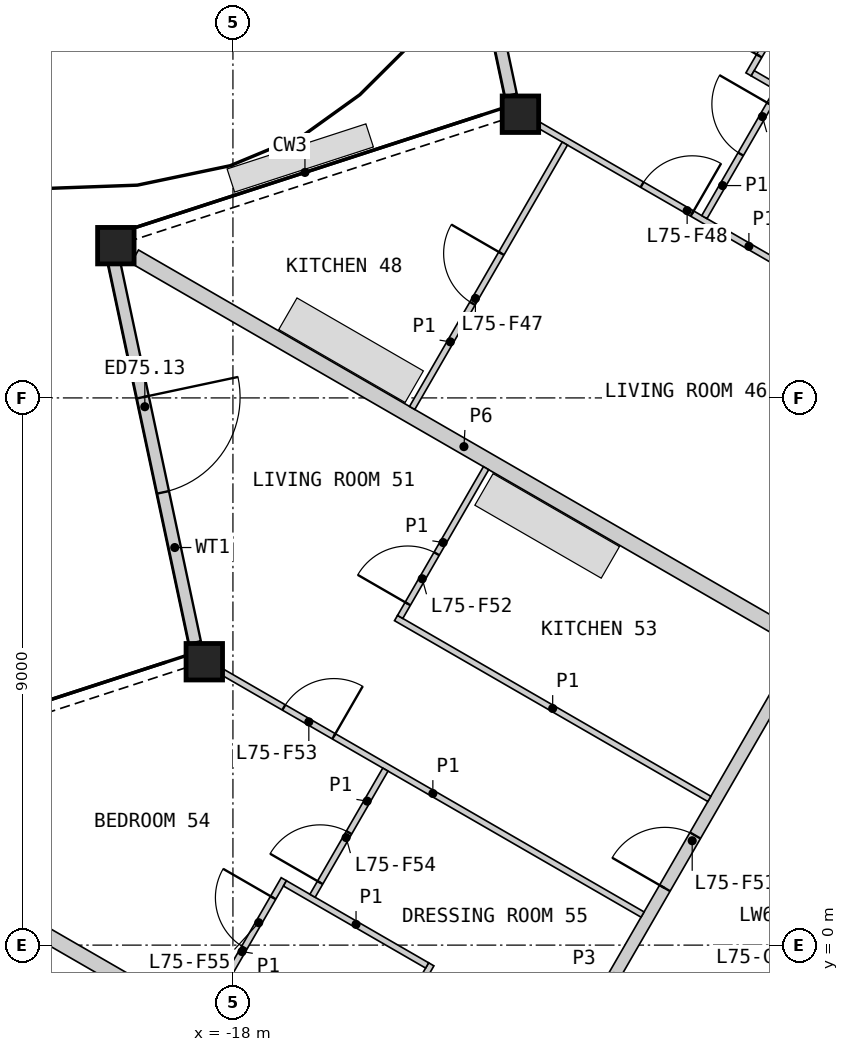
"""IFC4 building model, lengths in metres.
Left out: names, types, materials, properties, quantities, classifications, styles, units other than length and angle.
Written with IfcOpenShell. Run it as: python <this file> out.ifc"""

import sys

from ifc_helpers import new_model, si_unit, direction, frame, frame_2d, origin, origin_2d, place, context, subcontext, project, spatial, rectangle, hollow_rectangle, extrude, element, fill, save


model = new_model("IFC4")
c1 = context("Model", 3, precision=1e-05, world=origin(), true_north=direction((0.0, 1.0)))
c2 = subcontext(c1, "Body", "Model", "MODEL_VIEW")
j1 = project(units=[si_unit("LENGTHUNIT", "METRE"), si_unit("PLANEANGLEUNIT", "RADIAN")], contexts=[c1])
p1 = place(None, origin())
s1 = spatial("IfcSite", under=j1, at=p1, CompositionType="ELEMENT")
p2 = place(p1, origin())
s2 = spatial("IfcBuilding", under=s1, at=p2, CompositionType="ELEMENT")
p3 = place(p2, frame((0.0, 0.0, 335.8)))
s3 = spatial("IfcBuildingStorey", under=s2, at=p3, CompositionType="ELEMENT", Elevation=335.8)
for number, where, z_axis, x_axis in (
    (1, (-13.272, 13.666, 0.0), (0.0, 0.0, 1.0), (1.0, 0.0, 0.0)),
    (2, (-19.926, 11.504, 0.0), (0.0, 0.0, 1.0), (1.0, 0.0, 0.0)),
    (3, (-18.471, 4.661, 0.0), (0.0, 0.0, 1.0), (1.0, 0.0, 0.0)),
):
    element("IfcColumn", number, at=place(p3, frame(where, z_axis=z_axis, x_axis=x_axis)), inside=s3, PredefinedType="COLUMN", context=c2, shape_type="SweptSolid", body=[
        extrude(hollow_rectangle(XDim=0.6, YDim=0.6, WallThickness=0.04, at=origin_2d()), origin(), (0.0, 0.0, 1.0), 3.4),
    ])
p4 = place(p3, frame((-14.756, 20.225, 0.0), z_axis=(0.0, 0.0, 1.0), x_axis=(0.207888038934, -0.978152627798, 0.0)))
e4 = element("IfcWall", 4, at=p4, inside=s3, PredefinedType="SOLIDWALL", context=c2, shape_type="SweptSolid", body=[
    extrude(rectangle(XDim=6.382, YDim=0.2, at=frame_2d((3.191, 0.0))), origin(), (0.0, 0.0, 1.0), 2.488),
])
p5 = place(p4, frame((2.262, 0.0, 0.0)))
e5 = element("IfcOpeningElement", 5, at=p5, cuts=e4, PredefinedType="OPENING", context=c2, shape_type="SweptSolid", body=[
    extrude(rectangle(XDim=1.6, YDim=2.25, at=frame_2d((0.8, 1.125))), frame((0.0, 0.11, 0.0), z_axis=(0.0, -1.0, 0.0), x_axis=(1.0, 0.0, 0.0)), (0.0, 0.0, 1.0), 0.22),
])
p6 = place(p3, frame((-19.953, 11.225, 0.0), z_axis=(0.0, 0.0, 1.0), x_axis=(0.207915447, -0.978146802325, 0.0)))
e6 = element("IfcWall", 6, at=p6, inside=s3, PredefinedType="SOLIDWALL", context=c2, shape_type="SweptSolid", body=[
    extrude(rectangle(XDim=6.387, YDim=0.2, at=frame_2d((3.193, 0.0))), origin(), (0.0, 0.0, 1.0), 2.488),
])
p7 = place(p6, frame((2.262, 0.0, 0.0)))
e7 = element("IfcOpeningElement", 7, at=p7, cuts=e6, PredefinedType="OPENING", context=c2, shape_type="SweptSolid", body=[
    extrude(rectangle(XDim=1.6, YDim=2.25, at=frame_2d((0.8, 1.125))), frame((0.0, 0.11, 0.0), z_axis=(0.0, -1.0, 0.0), x_axis=(1.0, 0.0, 0.0)), (0.0, 0.0, 1.0), 0.22),
])
p8 = place(p3, frame((-8.44, -0.208, 0.0), z_axis=(0.0, 0.0, 1.0), x_axis=(-0.500001951578, -0.866024277037, 0.0)))
e8 = element("IfcWall", 8, at=p8, inside=s3, PredefinedType="SHEAR", context=c2, shape_type="SweptSolid", body=[
    extrude(rectangle(XDim=2.243, YDim=0.6, at=frame_2d((1.122, 0.0))), origin(), (0.0, 0.0, 1.0), 3.1),
])
p9 = place(p8, frame((0.7, 0.0, 0.0)))
e9 = element("IfcOpeningElement", 9, at=p9, cuts=e8, PredefinedType="OPENING", context=c2, shape_type="SweptSolid", body=[
    extrude(rectangle(XDim=1.0, YDim=2.1, at=frame_2d((0.5, 1.05))), frame((0.0, 0.31, 0.0), z_axis=(0.0, -1.0, 0.0), x_axis=(1.0, 0.0, 0.0)), (0.0, 0.0, 1.0), 0.62),
])
p10 = place(p3, frame((-19.615, 11.325, 0.0), z_axis=(0.0, 0.0, 1.0), x_axis=(0.86602139559, -0.500006942333, 0.0)))
e10 = element("IfcWall", 10, at=p10, inside=s3, PredefinedType="PARTITIONING", context=c2, shape_type="SweptSolid", body=[
    extrude(rectangle(XDim=12.505, YDim=0.25, at=frame_2d((6.252, 0.0))), origin(), (0.0, 0.0, 1.0), 2.33),
])
p11 = place(p3, frame((-12.748, -2.269, 0.0), z_axis=(0.0, 0.0, 1.0), x_axis=(0.499984266882, 0.866034487114, 0.0)))
e11 = element("IfcWall", 11, at=p11, inside=s3, PredefinedType="PARTITIONING", context=c2, shape_type="SweptSolid", body=[
    extrude(rectangle(XDim=8.099, YDim=0.2, at=frame_2d((4.049, 0.0))), origin(), (0.0, 0.0, 1.0), 3.1),
])
p12 = place(p11, frame((3.702, 0.0, 0.0)))
e12 = element("IfcOpeningElement", 12, at=p12, cuts=e11, PredefinedType="OPENING", context=c2, shape_type="SweptSolid", body=[
    extrude(rectangle(XDim=1.0, YDim=2.1, at=frame_2d((0.5, 1.05))), frame((0.0, 0.11, 0.0), z_axis=(0.0, -1.0, 0.0), x_axis=(1.0, 0.0, 0.0)), (0.0, 0.0, 1.0), 0.22),
])
p13 = place(p3, frame((-24.815, 2.326, 0.0), z_axis=(0.0, 0.0, 1.0), x_axis=(0.866024038922, -0.500002364004, 0.0)))
e13 = element("IfcWall", 13, at=p13, inside=s3, PredefinedType="PARTITIONING", context=c2, shape_type="SweptSolid", body=[
    extrude(rectangle(XDim=7.198, YDim=0.25, at=frame_2d((3.599, 0.0))), origin(), (0.0, 0.0, 1.0), 2.33),
])
p14 = place(p3, frame((-18.161, 4.485, 0.0), z_axis=(0.0, 0.0, 1.0), x_axis=(0.866023773276, -0.500002824113, 0.0)))
e14 = element("IfcWall", 14, at=p14, inside=s3, PredefinedType="PARTITIONING", context=c2, shape_type="SweptSolid", body=[
    extrude(rectangle(XDim=7.965, YDim=0.1, at=frame_2d((3.982, 0.0))), origin(), (0.0, 0.0, 1.0), 2.33),
])
p15 = place(p14, frame((1.152, 0.0, 0.0)))
e15 = element("IfcOpeningElement", 15, at=p15, cuts=e14, PredefinedType="OPENING", context=c2, shape_type="SweptSolid", body=[
    extrude(rectangle(XDim=0.95, YDim=2.1, at=frame_2d((0.475, 1.05))), frame((0.0, 0.06, 0.0), z_axis=(0.0, -1.0, 0.0), x_axis=(1.0, 0.0, 0.0)), (0.0, 0.0, 1.0), 0.12),
])
p16 = place(p3, frame((-12.962, 13.484, 0.0), z_axis=(0.0, 0.0, 1.0), x_axis=(0.866032392051, -0.499987895772, 0.0)))
e16 = element("IfcWall", 16, at=p16, inside=s3, PredefinedType="PARTITIONING", context=c2, shape_type="SweptSolid", body=[
    extrude(rectangle(XDim=7.962, YDim=0.1, at=frame_2d((3.981, 0.0))), origin(), (0.0, 0.0, 1.0), 2.33),
])
p17 = place(p16, frame((1.953, 0.0, 0.0)))
e17 = element("IfcOpeningElement", 17, at=p17, cuts=e16, PredefinedType="OPENING", context=c2, shape_type="SweptSolid", body=[
    extrude(rectangle(XDim=0.95, YDim=2.1, at=frame_2d((0.475, 1.05))), frame((0.0, 0.06, 0.0), z_axis=(0.0, -1.0, 0.0), x_axis=(1.0, 0.0, 0.0)), (0.0, 0.0, 1.0), 0.12),
])
p18 = place(p3, frame((-15.318, 5.38, 0.0), z_axis=(0.0, 0.0, 1.0), x_axis=(0.866035260786, -0.499982926783, 0.0)))
e18 = element("IfcWall", 18, at=p18, inside=s3, PredefinedType="PARTITIONING", context=c2, shape_type="SweptSolid", body=[
    extrude(rectangle(XDim=5.95, YDim=0.1, at=frame_2d((2.975, 0.0))), origin(), (0.0, 0.0, 1.0), 2.33),
])
p19 = place(p3, frame((-17.488, -5.079, 0.0), z_axis=(0.0, 0.0, 1.0), x_axis=(0.499996545922, 0.866027397988, 0.0)))
e19 = element("IfcWall", 19, at=p19, inside=s3, PredefinedType="PARTITIONING", context=c2, shape_type="SweptSolid", body=[
    extrude(rectangle(XDim=5.5, YDim=0.1, at=frame_2d((2.75, 0.0))), origin(), (0.0, 0.0, 1.0), 2.33),
])
p20 = place(p3, frame((-19.913, -3.679, 0.0), z_axis=(0.0, 0.0, 1.0), x_axis=(0.500015767406, 0.866016300277, 0.0)))
e20 = element("IfcWall", 20, at=p20, inside=s3, PredefinedType="PARTITIONING", context=c2, shape_type="SweptSolid", body=[
    extrude(rectangle(XDim=5.5, YDim=0.1, at=frame_2d((2.75, 0.0))), origin(), (0.0, 0.0, 1.0), 2.33),
])
p21 = place(p20, frame((4.199, 0.0, 0.0)))
e21 = element("IfcOpeningElement", 21, at=p21, cuts=e20, PredefinedType="OPENING", context=c2, shape_type="SweptSolid", body=[
    extrude(rectangle(XDim=0.95, YDim=2.1, at=frame_2d((0.475, 1.05))), frame((0.0, 0.06, 0.0), z_axis=(0.0, -1.0, 0.0), x_axis=(1.0, 0.0, 0.0)), (0.0, 0.0, 1.0), 0.12),
])
p22 = place(p20, frame((0.25, 0.0, 0.0)))
e22 = element("IfcOpeningElement", 22, at=p22, cuts=e20, PredefinedType="OPENING", context=c2, shape_type="SweptSolid", body=[
    extrude(rectangle(XDim=0.95, YDim=2.1, at=frame_2d((0.475, 1.05))), frame((0.0, 0.06, 0.0), z_axis=(0.0, -1.0, 0.0), x_axis=(1.0, 0.0, 0.0)), (0.0, 0.0, 1.0), 0.12),
])
p23 = place(p3, frame((-9.52, 14.321, 0.0), z_axis=(0.0, 0.0, 1.0), x_axis=(0.49997732567, 0.866038494419, 0.0)))
e23 = element("IfcWall", 23, at=p23, inside=s3, PredefinedType="PARTITIONING", context=c2, shape_type="SweptSolid", body=[
    extrude(rectangle(XDim=5.5, YDim=0.1, at=frame_2d((2.75, 0.0))), origin(), (0.0, 0.0, 1.0), 2.33),
])
p24 = place(p23, frame((4.3, 0.0, 0.0)))
e24 = element("IfcOpeningElement", 24, at=p24, cuts=e23, PredefinedType="OPENING", context=c2, shape_type="SweptSolid", body=[
    extrude(rectangle(XDim=0.95, YDim=2.1, at=frame_2d((0.475, 1.05))), frame((0.0, 0.06, 0.0), z_axis=(0.0, -1.0, 0.0), x_axis=(1.0, 0.0, 0.0)), (0.0, 0.0, 1.0), 0.12),
])
p25 = place(p23, frame((0.351, 0.0, 0.0)))
e25 = element("IfcOpeningElement", 25, at=p25, cuts=e23, PredefinedType="OPENING", context=c2, shape_type="SweptSolid", body=[
    extrude(rectangle(XDim=0.95, YDim=2.1, at=frame_2d((0.475, 1.05))), frame((0.0, 0.06, 0.0), z_axis=(0.0, -1.0, 0.0), x_axis=(1.0, 0.0, 0.0)), (0.0, 0.0, 1.0), 0.12),
])
p26 = place(p3, frame((-15.052, 8.835, 0.0), z_axis=(0.0, 0.0, 1.0), x_axis=(0.500008642379, 0.866020414047, 0.0)))
e26 = element("IfcWall", 26, at=p26, inside=s3, PredefinedType="PARTITIONING", context=c2, shape_type="SweptSolid", body=[
    extrude(rectangle(XDim=5.021, YDim=0.1, at=frame_2d((2.511, 0.0))), origin(), (0.0, 0.0, 1.0), 2.33),
])
p27 = place(p26, frame((1.985, 0.0, 0.0)))
e27 = element("IfcOpeningElement", 27, at=p27, cuts=e26, PredefinedType="OPENING", context=c2, shape_type="SweptSolid", body=[
    extrude(rectangle(XDim=0.95, YDim=2.1, at=frame_2d((0.475, 1.05))), frame((0.0, 0.06, 0.0), z_axis=(0.0, -1.0, 0.0), x_axis=(1.0, 0.0, 0.0)), (0.0, 0.0, 1.0), 0.12),
])
p28 = place(p3, frame((-15.25, 5.398, 0.0), z_axis=(0.0, 0.0, 1.0), x_axis=(0.499959355765, 0.866048868473, 0.0)))
e28 = element("IfcWall", 28, at=p28, inside=s3, PredefinedType="PARTITIONING", context=c2, shape_type="SweptSolid", body=[
    extrude(rectangle(XDim=2.825, YDim=0.1, at=frame_2d((1.413, 0.0))), origin(), (0.0, 0.0, 1.0), 2.33),
])
p29 = place(p28, frame((0.25, 0.0, 0.0)))
e29 = element("IfcOpeningElement", 29, at=p29, cuts=e28, PredefinedType="OPENING", context=c2, shape_type="SweptSolid", body=[
    extrude(rectangle(XDim=0.95, YDim=2.1, at=frame_2d((0.475, 1.05))), frame((0.0, 0.06, 0.0), z_axis=(0.0, -1.0, 0.0), x_axis=(1.0, 0.0, 0.0)), (0.0, 0.0, 1.0), 0.12),
])
p30 = place(p3, frame((-9.452, 14.34, 0.0), z_axis=(0.0, 0.0, 1.0), x_axis=(0.866036505625, -0.499980770555, 0.0)))
e30 = element("IfcWall", 30, at=p30, inside=s3, PredefinedType="PARTITIONING", context=c2, shape_type="SweptSolid", body=[
    extrude(rectangle(XDim=2.7, YDim=0.1, at=frame_2d((1.35, 0.0))), origin(), (0.0, 0.0, 1.0), 2.33),
])
p31 = place(p3, frame((-17.145, 1.016, 0.0), z_axis=(0.0, 0.0, 1.0), x_axis=(0.86599734893, -0.500048589285, 0.0)))
e31 = element("IfcWall", 31, at=p31, inside=s3, PredefinedType="PARTITIONING", context=c2, shape_type="SweptSolid", body=[
    extrude(rectangle(XDim=2.7, YDim=0.1, at=frame_2d((1.35, 0.0))), origin(), (0.0, 0.0, 1.0), 2.33),
])
p32 = place(p3, frame((-16.691, 0.812, 0.0), z_axis=(0.0, 0.0, 1.0), x_axis=(0.499963527173, 0.866046460357, 0.0)))
e32 = element("IfcWall", 32, at=p32, inside=s3, PredefinedType="PARTITIONING", context=c2, shape_type="SweptSolid", body=[
    extrude(rectangle(XDim=2.396, YDim=0.1, at=frame_2d((1.198, 0.0))), origin(), (0.0, 0.0, 1.0), 2.33),
])
p33 = place(p32, frame((0.25, 0.0, 0.0)))
e33 = element("IfcOpeningElement", 33, at=p33, cuts=e32, PredefinedType="OPENING", context=c2, shape_type="SweptSolid", body=[
    extrude(rectangle(XDim=0.95, YDim=2.1, at=frame_2d((0.475, 1.05))), frame((0.0, 0.06, 0.0), z_axis=(0.0, -1.0, 0.0), x_axis=(1.0, 0.0, 0.0)), (0.0, 0.0, 1.0), 0.12),
])
p34 = place(p3, frame((-10.247, 11.974, 0.0), z_axis=(0.0, 0.0, 1.0), x_axis=(0.499995825336, 0.866027814014, 0.0)))
e34 = element("IfcWall", 34, at=p34, inside=s3, PredefinedType="PARTITIONING", context=c2, shape_type="SweptSolid", body=[
    extrude(rectangle(XDim=2.396, YDim=0.1, at=frame_2d((1.198, 0.0))), origin(), (0.0, 0.0, 1.0), 2.33),
])
p35 = place(p34, frame((1.196, 0.0, 0.0)))
e35 = element("IfcOpeningElement", 35, at=p35, cuts=e34, PredefinedType="OPENING", context=c2, shape_type="SweptSolid", body=[
    extrude(rectangle(XDim=0.95, YDim=2.1, at=frame_2d((0.475, 1.05))), frame((0.0, 0.06, 0.0), z_axis=(0.0, -1.0, 0.0), x_axis=(1.0, 0.0, 0.0)), (0.0, 0.0, 1.0), 0.12),
])
p36 = place(p7, origin())
e36 = element("IfcDoor", 36, at=p36, inside=s3, OperationType="DOUBLE_DOOR_SINGLE_SWING", PredefinedType="DOOR", context=c2, shape_type="SweptSolid", body=[
    extrude(rectangle(XDim=1.6, YDim=2.25, at=frame_2d((0.8, 1.125))), frame((0.0, 0.025, 0.0), z_axis=(0.0, -1.0, 0.0), x_axis=(1.0, 0.0, 0.0)), (0.0, 0.0, 1.0), 0.05),
])
fill(e7, e36)
p37 = place(p27, origin())
e37 = element("IfcDoor", 37, at=p37, inside=s3, OperationType="SINGLE_SWING_RIGHT", PredefinedType="DOOR", context=c2, shape_type="SweptSolid", body=[
    extrude(rectangle(XDim=0.95, YDim=2.1, at=frame_2d((0.475, 1.05))), frame((0.0, 0.025, 0.0), z_axis=(0.0, -1.0, 0.0), x_axis=(1.0, 0.0, 0.0)), (0.0, 0.0, 1.0), 0.05),
])
fill(e27, e37)
p38 = place(p17, origin())
e38 = element("IfcDoor", 38, at=p38, inside=s3, OperationType="SINGLE_SWING_RIGHT", PredefinedType="DOOR", context=c2, shape_type="SweptSolid", body=[
    extrude(rectangle(XDim=0.95, YDim=2.1, at=frame_2d((0.475, 1.05))), frame((0.0, 0.025, 0.0), z_axis=(0.0, -1.0, 0.0), x_axis=(1.0, 0.0, 0.0)), (0.0, 0.0, 1.0), 0.05),
])
fill(e17, e38)
p39 = place(p35, origin())
e39 = element("IfcDoor", 39, at=p39, inside=s3, OperationType="SINGLE_SWING_RIGHT", PredefinedType="DOOR", context=c2, shape_type="SweptSolid", body=[
    extrude(rectangle(XDim=0.95, YDim=2.1, at=frame_2d((0.475, 1.05))), frame((0.0, 0.025, 0.0), z_axis=(0.0, -1.0, 0.0), x_axis=(1.0, 0.0, 0.0)), (0.0, 0.0, 1.0), 0.05),
])
fill(e35, e39)
p40 = place(p25, origin())
e40 = element("IfcDoor", 40, at=p40, inside=s3, OperationType="SINGLE_SWING_LEFT", PredefinedType="DOOR", context=c2, shape_type="SweptSolid", body=[
    extrude(rectangle(XDim=0.95, YDim=2.1, at=frame_2d((0.475, 1.05))), frame((0.0, 0.025, 0.0), z_axis=(0.0, -1.0, 0.0), x_axis=(1.0, 0.0, 0.0)), (0.0, 0.0, 1.0), 0.05),
])
fill(e25, e40)
p41 = place(p12, origin())
e41 = element("IfcDoor", 41, at=p41, inside=s3, OperationType="SINGLE_SWING_LEFT", PredefinedType="DOOR", context=c2, shape_type="SweptSolid", body=[
    extrude(rectangle(XDim=1.0, YDim=2.1, at=frame_2d((0.5, 1.05))), frame((0.0, 0.025, 0.0), z_axis=(0.0, -1.0, 0.0), x_axis=(1.0, 0.0, 0.0)), (0.0, 0.0, 1.0), 0.05),
])
fill(e12, e41)
p42 = place(p29, origin())
e42 = element("IfcDoor", 42, at=p42, inside=s3, OperationType="SINGLE_SWING_LEFT", PredefinedType="DOOR", context=c2, shape_type="SweptSolid", body=[
    extrude(rectangle(XDim=0.95, YDim=2.1, at=frame_2d((0.475, 1.05))), frame((0.0, 0.025, 0.0), z_axis=(0.0, -1.0, 0.0), x_axis=(1.0, 0.0, 0.0)), (0.0, 0.0, 1.0), 0.05),
])
fill(e29, e42)
p43 = place(p15, origin())
e43 = element("IfcDoor", 43, at=p43, inside=s3, OperationType="SINGLE_SWING_RIGHT", PredefinedType="DOOR", context=c2, shape_type="SweptSolid", body=[
    extrude(rectangle(XDim=0.95, YDim=2.1, at=frame_2d((0.475, 1.05))), frame((0.0, 0.025, 0.0), z_axis=(0.0, -1.0, 0.0), x_axis=(1.0, 0.0, 0.0)), (0.0, 0.0, 1.0), 0.05),
])
fill(e15, e43)
p44 = place(p33, origin())
e44 = element("IfcDoor", 44, at=p44, inside=s3, OperationType="SINGLE_SWING_LEFT", PredefinedType="DOOR", context=c2, shape_type="SweptSolid", body=[
    extrude(rectangle(XDim=0.95, YDim=2.1, at=frame_2d((0.475, 1.05))), frame((0.0, 0.025, 0.0), z_axis=(0.0, -1.0, 0.0), x_axis=(1.0, 0.0, 0.0)), (0.0, 0.0, 1.0), 0.05),
])
fill(e33, e44)
p45 = place(p21, origin())
e45 = element("IfcDoor", 45, at=p45, inside=s3, OperationType="SINGLE_SWING_RIGHT", PredefinedType="DOOR", context=c2, shape_type="SweptSolid", body=[
    extrude(rectangle(XDim=0.95, YDim=2.1, at=frame_2d((0.475, 1.05))), frame((0.0, 0.025, 0.0), z_axis=(0.0, -1.0, 0.0), x_axis=(1.0, 0.0, 0.0)), (0.0, 0.0, 1.0), 0.05),
])
fill(e21, e45)
save(model, sys.argv[1])
